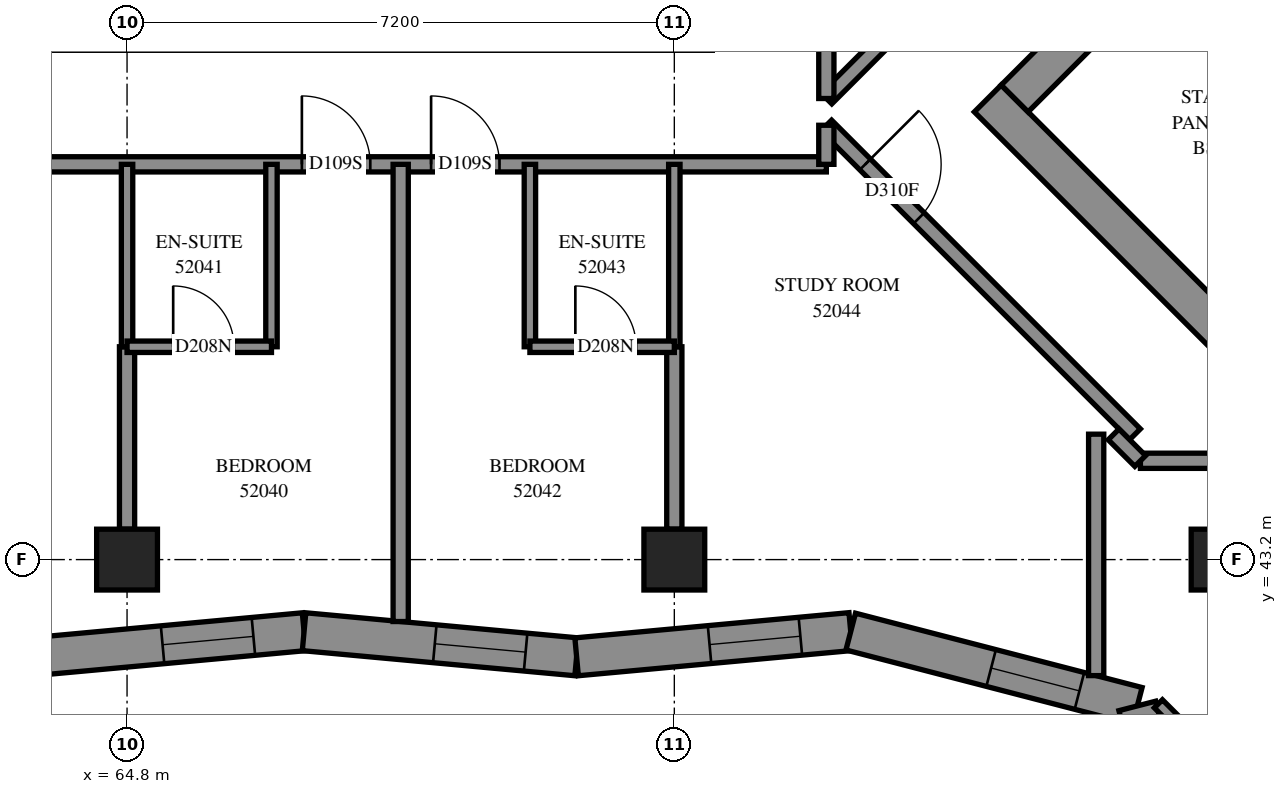
"""IFC4 building model, lengths in metres.
Left out: names, types, materials, properties, quantities, classifications, styles, units other than length and angle.
Written with IfcOpenShell. Run it as: python <this file> out.ifc"""

import sys

from ifc_helpers import new_model, si_unit, direction, frame, frame_2d, origin, origin_2d, place, context, subcontext, project, spatial, polyline, rectangle, outline, extrude, element, fill, save


model = new_model("IFC4")
c1 = context("Model", 3, precision=1e-05, world=origin(), true_north=direction((0.0, 1.0)))
c2 = subcontext(c1, "Body", "Model", "MODEL_VIEW")
j1 = project(units=[si_unit("LENGTHUNIT", "METRE"), si_unit("PLANEANGLEUNIT", "RADIAN")], contexts=[c1])
p1 = place(None, origin())
s1 = spatial("IfcSite", under=j1, at=p1, CompositionType="ELEMENT")
p2 = place(p1, origin())
s2 = spatial("IfcBuilding", under=s1, at=p2, CompositionType="ELEMENT")
p3 = place(p2, frame((0.0, 0.0, 193.0)))
s3 = spatial("IfcBuildingStorey", under=s2, at=p3, CompositionType="ELEMENT", Elevation=193.0)
for number, where, z_axis, x_axis in (
    (1, (64.8, 43.2, 0.0), (0.0, 0.0, 1.0), (1.0, 0.0, 0.0)),
    (2, (72.0, 43.2, 0.0), (0.0, 0.0, 1.0), (1.0, 0.0, 0.0)),
    (3, (79.2, 43.2, 0.0), (0.0, 0.0, 1.0), (1.0, 0.0, 0.0)),
):
    element("IfcColumn", number, at=place(p3, frame(where, z_axis=z_axis, x_axis=x_axis)), inside=s3, PredefinedType="COLUMN", context=c2, shape_type="SweptSolid", body=[
        extrude(rectangle(XDim=0.8, YDim=0.8, at=origin_2d()), origin(), (0.0, 0.0, 1.0), 3.1),
    ])
p4 = place(p3, frame((76.124, 49.267, -0.3), z_axis=(0.0, 0.0, 1.0), x_axis=(0.7071067812, -0.7071067812, 0.0)))
e4 = element("IfcWall", 4, at=p4, inside=s3, PredefinedType="SHEAR", context=c2, shape_type="SweptSolid", body=[
    extrude(rectangle(XDim=15.4, YDim=0.5, at=frame_2d((7.7, 0.0))), origin(), (0.0, 0.0, 1.0), 2.7),
])
p5 = place(p3, frame((76.478, 49.267, -0.3), z_axis=(0.0, 0.0, 1.0), x_axis=(0.7071067812, 0.7071067812, 0.0)))
e5 = element("IfcWall", 5, at=p5, inside=s3, PredefinedType="SHEAR", context=c2, shape_type="SweptSolid", body=[
    extrude(rectangle(XDim=14.4, YDim=0.5, at=frame_2d((7.2, 0.0))), origin(), (0.0, 0.0, 1.0), 2.7),
])
p6 = place(p5, frame((4.55, 0.0, 0.3)))
e6 = element("IfcOpeningElement", 6, at=p6, cuts=e5, PredefinedType="OPENING", context=c2, shape_type="SweptSolid", body=[
    extrude(rectangle(XDim=1.1, YDim=2.1, at=frame_2d((0.55, 1.05))), frame((0.0, 0.26, 0.0), z_axis=(0.0, -1.0, 0.0), x_axis=(1.0, 0.0, 0.0)), (0.0, 0.0, 1.0), 0.52),
])
p7 = place(p5, frame((11.35, 0.0, 0.3)))
e7 = element("IfcOpeningElement", 7, at=p7, cuts=e5, PredefinedType="OPENING", context=c2, shape_type="SweptSolid", body=[
    extrude(rectangle(XDim=1.1, YDim=2.1, at=frame_2d((0.55, 1.05))), frame((0.0, 0.26, 0.0), z_axis=(0.0, -1.0, 0.0), x_axis=(1.0, 0.0, 0.0)), (0.0, 0.0, 1.0), 0.52),
])
p8 = place(p3, frame((78.988, 51.423, 0.0), z_axis=(0.0, 0.0, 1.0), x_axis=(0.7071067812, -0.7071067812, 0.0)))
e8 = element("IfcWall", 8, at=p8, inside=s3, PredefinedType="SOLIDWALL", context=c2, shape_type="SweptSolid", body=[
    extrude(rectangle(XDim=14.4, YDim=0.3, at=frame_2d((7.2, 0.0))), origin(), (0.0, 0.0, 1.0), 3.1),
])
p9 = place(p8, frame((1.35, 0.0, 0.0)))
e9 = element("IfcOpeningElement", 9, at=p9, cuts=e8, PredefinedType="OPENING", context=c2, shape_type="SweptSolid", body=[
    extrude(rectangle(XDim=0.9, YDim=2.1, at=frame_2d((0.45, 1.05))), frame((0.0, 0.16, 0.0), z_axis=(0.0, -1.0, 0.0), x_axis=(1.0, 0.0, 0.0)), (0.0, 0.0, 1.0), 0.32),
])
p10 = place(p8, frame((4.95, 0.0, 0.0)))
e10 = element("IfcOpeningElement", 10, at=p10, cuts=e8, PredefinedType="OPENING", context=c2, shape_type="SweptSolid", body=[
    extrude(rectangle(XDim=0.9, YDim=2.1, at=frame_2d((0.45, 1.05))), frame((0.0, 0.16, 0.0), z_axis=(0.0, -1.0, 0.0), x_axis=(1.0, 0.0, 0.0)), (0.0, 0.0, 1.0), 0.32),
])
p11 = place(p8, frame((8.55, 0.0, 0.0)))
e11 = element("IfcOpeningElement", 11, at=p11, cuts=e8, PredefinedType="OPENING", context=c2, shape_type="SweptSolid", body=[
    extrude(rectangle(XDim=0.9, YDim=2.1, at=frame_2d((0.45, 1.05))), frame((0.0, 0.16, 0.0), z_axis=(0.0, -1.0, 0.0), x_axis=(1.0, 0.0, 0.0)), (0.0, 0.0, 1.0), 0.32),
])
p12 = place(p8, frame((12.05, 0.0, 0.0)))
e12 = element("IfcOpeningElement", 12, at=p12, cuts=e8, PredefinedType="OPENING", context=c2, shape_type="SweptSolid", body=[
    extrude(rectangle(XDim=1.1, YDim=2.1, at=frame_2d((0.55, 1.05))), frame((0.0, 0.16, 0.0), z_axis=(0.0, -1.0, 0.0), x_axis=(1.0, 0.0, 0.0)), (0.0, 0.0, 1.0), 0.32),
])
p13 = place(p3, frame((63.543, 41.921, 0.0), z_axis=(0.0, 0.0, 1.0), x_axis=(0.9957919806, 0.09164241, 0.0)))
e13 = element("IfcWall", 13, at=p13, inside=s3, PredefinedType="SOLIDWALL", context=c2, shape_type="SweptSolid", body=[
    extrude(outline(polyline([(-0.023, -0.25), (3.578, -0.25), (3.624, 0.25), (0.023, 0.25), (-0.023, -0.25)])), origin(), (0.0, 0.0, 1.0), 3.1),
])
p14 = place(p13, frame((1.732, 0.0, 0.45)))
e14 = element("IfcOpeningElement", 14, at=p14, cuts=e13, PredefinedType="OPENING", context=c2, shape_type="SweptSolid", body=[
    extrude(rectangle(XDim=1.2, YDim=2.5, at=frame_2d((0.6, 1.25))), frame((0.0, 0.26, 0.0), z_axis=(0.0, -1.0, 0.0), x_axis=(1.0, 0.0, 0.0)), (0.0, 0.0, 1.0), 0.52),
])
p15 = place(p3, frame((67.129, 42.251, 0.0), z_axis=(0.0, 0.0, 1.0), x_axis=(0.9957917474, -0.0916449443, 0.0)))
e15 = element("IfcWall", 15, at=p15, inside=s3, PredefinedType="SOLIDWALL", context=c2, shape_type="SweptSolid", body=[
    extrude(outline(polyline([(0.023, -0.25), (3.624, -0.25), (3.578, 0.25), (-0.023, 0.25), (0.023, -0.25)])), origin(), (0.0, 0.0, 1.0), 3.1),
])
p16 = place(p15, frame((1.727, 0.0, 0.45)))
e16 = element("IfcOpeningElement", 16, at=p16, cuts=e15, PredefinedType="OPENING", context=c2, shape_type="SweptSolid", body=[
    extrude(rectangle(XDim=1.2, YDim=2.5, at=frame_2d((0.6, 1.25))), frame((0.0, 0.26, 0.0), z_axis=(0.0, -1.0, 0.0), x_axis=(1.0, 0.0, 0.0)), (0.0, 0.0, 1.0), 0.52),
])
p17 = place(p3, frame((70.714, 41.921, 0.0), z_axis=(0.0, 0.0, 1.0), x_axis=(0.9957941627, 0.0916186959, 0.0)))
e17 = element("IfcWall", 17, at=p17, inside=s3, PredefinedType="SOLIDWALL", context=c2, shape_type="SweptSolid", body=[
    extrude(outline(polyline([(-0.023, -0.25), (3.578, -0.25), (3.665, 0.25), (0.023, 0.25), (-0.023, -0.25)])), origin(), (0.0, 0.0, 1.0), 3.1),
])
p18 = place(p17, frame((1.756, 0.0, 0.45)))
e18 = element("IfcOpeningElement", 18, at=p18, cuts=e17, PredefinedType="OPENING", context=c2, shape_type="SweptSolid", body=[
    extrude(rectangle(XDim=1.2, YDim=2.5, at=frame_2d((0.6, 1.25))), frame((0.0, 0.26, 0.0), z_axis=(0.0, -1.0, 0.0), x_axis=(1.0, 0.0, 0.0)), (0.0, 0.0, 1.0), 0.52),
])
p19 = place(p3, frame((74.321, 42.253, 0.0), z_axis=(0.0, 0.0, 1.0), x_axis=(0.9679758757, -0.2510432315, 0.0)))
e19 = element("IfcWall", 19, at=p19, inside=s3, PredefinedType="SOLIDWALL", context=c2, shape_type="SweptSolid", body=[
    extrude(outline(polyline([(0.044, -0.25), (3.748, -0.25), (4.043, 0.25), (-0.044, 0.25), (0.044, -0.25)])), origin(), (0.0, 0.0, 1.0), 3.1),
])
p20 = place(p19, frame((1.909, 0.0, 0.45)))
e20 = element("IfcOpeningElement", 20, at=p20, cuts=e19, PredefinedType="OPENING", context=c2, shape_type="SweptSolid", body=[
    extrude(rectangle(XDim=1.2, YDim=2.5, at=frame_2d((0.6, 1.25))), frame((0.0, 0.26, 0.0), z_axis=(0.0, -1.0, 0.0), x_axis=(1.0, 0.0, 0.0)), (0.0, 0.0, 1.0), 0.52),
])
p21 = place(p3, frame((78.091, 41.275, 0.0), z_axis=(0.0, 0.0, 1.0), x_axis=(0.2493551668, -0.9684121028, 0.0)))
e21 = element("IfcWall", 21, at=p21, inside=s3, PredefinedType="SOLIDWALL", context=c2, shape_type="SweptSolid", body=[
    extrude(outline(polyline([(0.147, -0.25), (4.868, -0.25), (4.585, 0.25), (-0.147, 0.25), (0.147, -0.25)])), origin(), (0.0, 0.0, 1.0), 3.1),
])
p22 = place(p21, frame((2.207, 0.0, 0.45)))
e22 = element("IfcOpeningElement", 22, at=p22, cuts=e21, PredefinedType="OPENING", context=c2, shape_type="SweptSolid", body=[
    extrude(rectangle(XDim=1.2, YDim=2.5, at=frame_2d((0.6, 1.25))), frame((0.0, 0.26, 0.0), z_axis=(0.0, -1.0, 0.0), x_axis=(1.0, 0.0, 0.0)), (0.0, 0.0, 1.0), 0.52),
])
p23 = place(p21, frame((0.331, 0.0, 0.45)))
e23 = element("IfcOpeningElement", 23, at=p23, cuts=e21, PredefinedType="OPENING", context=c2, shape_type="SweptSolid", body=[
    extrude(rectangle(XDim=0.8, YDim=2.5, at=frame_2d((0.4, 1.25))), frame((0.0, 0.26, 0.0), z_axis=(0.0, -1.0, 0.0), x_axis=(1.0, 0.0, 0.0)), (0.0, 0.0, 1.0), 0.52),
])
p24 = place(p3, frame((55.6, 48.4, 0.0), z_axis=(0.0, 0.0, 1.0), x_axis=(1.0, 0.0, 0.0)))
e24 = element("IfcWall", 24, at=p24, inside=s3, PredefinedType="PARTITIONING", context=c2, shape_type="SweptSolid", body=[
    extrude(rectangle(XDim=18.4, YDim=0.2, at=frame_2d((9.2, 0.0))), origin(), (0.0, 0.0, 1.0), 3.1),
])
p25 = place(p24, frame((5.862, 0.0, 0.0)))
e25 = element("IfcOpeningElement", 25, at=p25, cuts=e24, PredefinedType="OPENING", context=c2, shape_type="SweptSolid", body=[
    extrude(rectangle(XDim=1.0, YDim=2.1, at=frame_2d((0.5, 1.05))), frame((0.0, 0.11, 0.0), z_axis=(0.0, -1.0, 0.0), x_axis=(1.0, 0.0, 0.0)), (0.0, 0.0, 1.0), 0.22),
])
p26 = place(p24, frame((11.5, 0.0, 0.0)))
e26 = element("IfcOpeningElement", 26, at=p26, cuts=e24, PredefinedType="OPENING", context=c2, shape_type="SweptSolid", body=[
    extrude(rectangle(XDim=0.9, YDim=2.1, at=frame_2d((0.45, 1.05))), frame((0.0, 0.11, 0.0), z_axis=(0.0, -1.0, 0.0), x_axis=(1.0, 0.0, 0.0)), (0.0, 0.0, 1.0), 0.22),
])
p27 = place(p24, frame((13.2, 0.0, 0.0)))
e27 = element("IfcOpeningElement", 27, at=p27, cuts=e24, PredefinedType="OPENING", context=c2, shape_type="SweptSolid", body=[
    extrude(rectangle(XDim=0.9, YDim=2.1, at=frame_2d((0.45, 1.05))), frame((0.0, 0.11, 0.0), z_axis=(0.0, -1.0, 0.0), x_axis=(1.0, 0.0, 0.0)), (0.0, 0.0, 1.0), 0.22),
])
p28 = place(p3, frame((68.4, 42.385, 0.0), z_axis=(0.0, 0.0, 1.0), x_axis=(0.0, 1.0, 0.0)))
e28 = element("IfcWall", 28, at=p28, inside=s3, PredefinedType="PARTITIONING", context=c2, shape_type="SweptSolid", body=[
    extrude(rectangle(XDim=6.015, YDim=0.2, at=frame_2d((3.007, 0.0))), origin(), (0.0, 0.0, 1.0), 3.1),
])
p29 = place(p3, frame((73.999, 48.911, 0.0), z_axis=(0.0, 0.0, 1.0), x_axis=(0.7071067812, -0.7071067812, 0.0)))
e29 = element("IfcWall", 29, at=p29, inside=s3, PredefinedType="PARTITIONING", context=c2, shape_type="SweptSolid", body=[
    extrude(rectangle(XDim=5.745, YDim=0.2, at=frame_2d((2.872, 0.0))), origin(), (0.0, 0.0, 1.0), 3.1),
])
p30 = place(p29, frame((0.724, 0.0, 0.0)))
e30 = element("IfcOpeningElement", 30, at=p30, cuts=e29, PredefinedType="OPENING", context=c2, shape_type="SweptSolid", body=[
    extrude(rectangle(XDim=1.0, YDim=2.1, at=frame_2d((0.5, 1.05))), frame((0.0, 0.11, 0.0), z_axis=(0.0, -1.0, 0.0), x_axis=(1.0, 0.0, 0.0)), (0.0, 0.0, 1.0), 0.22),
])
p31 = place(p3, frame((74.001, 49.267, 0.0), z_axis=(0.0, 0.0, 1.0), x_axis=(0.7071067812, 0.7071067812, 0.0)))
e31 = element("IfcWall", 31, at=p31, inside=s3, PredefinedType="PARTITIONING", context=c2, shape_type="SweptSolid", body=[
    extrude(rectangle(XDim=5.278, YDim=0.2, at=frame_2d((2.639, 0.0))), origin(), (0.0, 0.0, 1.0), 3.1),
])
p32 = place(p3, frame((74.0, 49.266, 0.0), z_axis=(0.0, 0.0, 1.0), x_axis=(0.0, 1.0, 0.0)))
e32 = element("IfcWall", 32, at=p32, inside=s3, PredefinedType="PARTITIONING", context=c2, shape_type="SweptSolid", body=[
    extrude(rectangle(XDim=3.734, YDim=0.2, at=frame_2d((1.867, 0.0))), origin(), (0.0, 0.0, 1.0), 3.1),
])
p33 = place(p3, frame((77.55, 41.674, 0.0), z_axis=(0.0, 0.0, 1.0), x_axis=(0.0, 1.0, 0.0)))
e33 = element("IfcWall", 33, at=p33, inside=s3, PredefinedType="PARTITIONING", context=c2, shape_type="SweptSolid", body=[
    extrude(rectangle(XDim=3.176, YDim=0.2, at=frame_2d((1.588, 0.0))), origin(), (0.0, 0.0, 1.0), 3.1),
])
p34 = place(p3, frame((78.368, 41.303, 0.0), z_axis=(0.0, 0.0, 1.0), x_axis=(0.7065867451, -0.7076264351, 0.0)))
e34 = element("IfcWall", 34, at=p34, inside=s3, PredefinedType="PARTITIONING", context=c2, shape_type="SweptSolid", body=[
    extrude(rectangle(XDim=2.982, YDim=0.15, at=frame_2d((1.491, 0.0))), origin(), (0.0, 0.0, 1.0), 3.1),
])
p35 = place(p3, frame((64.8, 43.6, 0.0), z_axis=(0.0, 0.0, 1.0), x_axis=(0.0, 1.0, 0.0)))
e35 = element("IfcWall", 35, at=p35, inside=s3, PredefinedType="PARTITIONING", context=c2, shape_type="SweptSolid", body=[
    extrude(rectangle(XDim=2.4, YDim=0.2, at=frame_2d((1.2, 0.0))), origin(), (0.0, 0.0, 1.0), 3.1),
])
for number, where, z_axis, x_axis in (
    (36, (66.7, 46.0, 0.0), (0.0, 0.0, 1.0), (0.0, 1.0, 0.0)),
    (37, (64.8, 46.0, 0.0), (0.0, 0.0, 1.0), (0.0, 1.0, 0.0)),
    (38, (70.1, 46.0, 0.0), (0.0, 0.0, 1.0), (0.0, 1.0, 0.0)),
):
    element("IfcWall", number, at=place(p3, frame(where, z_axis=z_axis, x_axis=x_axis)), inside=s3, PredefinedType="PARTITIONING", context=c2, shape_type="SweptSolid", body=[
        extrude(rectangle(XDim=2.4, YDim=0.15, at=frame_2d((1.2, 0.0))), origin(), (0.0, 0.0, 1.0), 3.1),
    ])
p36 = place(p3, frame((72.0, 43.6, 0.0), z_axis=(0.0, 0.0, 1.0), x_axis=(0.0, 1.0, 0.0)))
e39 = element("IfcWall", 39, at=p36, inside=s3, PredefinedType="PARTITIONING", context=c2, shape_type="SweptSolid", body=[
    extrude(rectangle(XDim=2.4, YDim=0.2, at=frame_2d((1.2, 0.0))), origin(), (0.0, 0.0, 1.0), 3.1),
])
p37 = place(p3, frame((72.0, 46.0, 0.0), z_axis=(0.0, 0.0, 1.0), x_axis=(0.0, 1.0, 0.0)))
e40 = element("IfcWall", 40, at=p37, inside=s3, PredefinedType="PARTITIONING", context=c2, shape_type="SweptSolid", body=[
    extrude(rectangle(XDim=2.4, YDim=0.15, at=frame_2d((1.2, 0.0))), origin(), (0.0, 0.0, 1.0), 3.1),
])
p38 = place(p3, frame((78.132, 44.5, 0.0), z_axis=(0.0, 0.0, 1.0), x_axis=(1.0, 0.0, 0.0)))
e41 = element("IfcWall", 41, at=p38, inside=s3, PredefinedType="PARTITIONING", context=c2, shape_type="SweptSolid", body=[
    extrude(rectangle(XDim=2.292, YDim=0.2, at=frame_2d((1.146, 0.0))), origin(), (0.0, 0.0, 1.0), 3.1),
])
p39 = place(p3, frame((78.661, 40.067, 0.0), z_axis=(0.0, 0.0, 1.0), x_axis=(0.7070829621, 0.7071305995, 0.0)))
e42 = element("IfcWall", 42, at=p39, inside=s3, PredefinedType="PARTITIONING", context=c2, shape_type="SweptSolid", body=[
    extrude(rectangle(XDim=2.099, YDim=0.15, at=frame_2d((1.05, 0.0))), origin(), (0.0, 0.0, 1.0), 3.1),
])
p40 = place(p3, frame((64.8, 46.0, 0.0), z_axis=(0.0, 0.0, 1.0), x_axis=(1.0, 0.0, 0.0)))
e43 = element("IfcWall", 43, at=p40, inside=s3, PredefinedType="PARTITIONING", context=c2, shape_type="SweptSolid", body=[
    extrude(rectangle(XDim=1.9, YDim=0.15, at=frame_2d((0.95, 0.0))), origin(), (0.0, 0.0, 1.0), 3.1),
])
p41 = place(p40, frame((0.607, 0.0, 0.0)))
e44 = element("IfcOpeningElement", 44, at=p41, cuts=e43, PredefinedType="OPENING", context=c2, shape_type="SweptSolid", body=[
    extrude(rectangle(XDim=0.8, YDim=2.1, at=frame_2d((0.4, 1.05))), frame((0.0, 0.085, 0.0), z_axis=(0.0, -1.0, 0.0), x_axis=(1.0, 0.0, 0.0)), (0.0, 0.0, 1.0), 0.17),
])
p42 = place(p3, frame((70.1, 46.0, 0.0), z_axis=(0.0, 0.0, 1.0), x_axis=(1.0, 0.0, 0.0)))
e45 = element("IfcWall", 45, at=p42, inside=s3, PredefinedType="PARTITIONING", context=c2, shape_type="SweptSolid", body=[
    extrude(rectangle(XDim=1.9, YDim=0.15, at=frame_2d((0.95, 0.0))), origin(), (0.0, 0.0, 1.0), 3.1),
])
p43 = place(p42, frame((0.598, 0.0, 0.0)))
e46 = element("IfcOpeningElement", 46, at=p43, cuts=e45, PredefinedType="OPENING", context=c2, shape_type="SweptSolid", body=[
    extrude(rectangle(XDim=0.8, YDim=2.1, at=frame_2d((0.4, 1.05))), frame((0.0, 0.085, 0.0), z_axis=(0.0, -1.0, 0.0), x_axis=(1.0, 0.0, 0.0)), (0.0, 0.0, 1.0), 0.17),
])
p44 = place(p3, frame((74.0, 48.4, 0.0), z_axis=(0.0, 0.0, 1.0), x_axis=(0.0, 1.0, 0.0)))
e47 = element("IfcWall", 47, at=p44, inside=s3, PredefinedType="PARTITIONING", context=c2, shape_type="SweptSolid", body=[
    extrude(rectangle(XDim=0.514, YDim=0.2, at=frame_2d((0.257, 0.0))), origin(), (0.0, 0.0, 1.0), 3.1),
])
p45 = place(p3, frame((77.779, 44.847, 0.0), z_axis=(0.0, 0.0, 1.0), x_axis=(0.7071067812, -0.7071067812, 0.0)))
e48 = element("IfcWall", 48, at=p45, inside=s3, PredefinedType="PARTITIONING", context=c2, shape_type="SweptSolid", body=[
    extrude(rectangle(XDim=0.495, YDim=0.2, at=frame_2d((0.247, 0.0))), origin(), (0.0, 0.0, 1.0), 3.1),
])
p46 = place(p14, origin())
e49 = element("IfcWindow", 49, at=p46, inside=s3, PartitioningType="SINGLE_PANEL", PredefinedType="WINDOW", context=c2, shape_type="SweptSolid", body=[
    extrude(rectangle(XDim=1.2, YDim=2.5, at=frame_2d((0.6, 1.25))), frame((0.0, 0.18, 0.0), z_axis=(0.0, -1.0, 0.0), x_axis=(1.0, 0.0, 0.0)), (0.0, 0.0, 1.0), 0.06),
])
fill(e14, e49)
p47 = place(p16, origin())
e50 = element("IfcWindow", 50, at=p47, inside=s3, PartitioningType="SINGLE_PANEL", PredefinedType="WINDOW", context=c2, shape_type="SweptSolid", body=[
    extrude(rectangle(XDim=1.2, YDim=2.5, at=frame_2d((0.6, 1.25))), frame((0.0, 0.18, 0.0), z_axis=(0.0, -1.0, 0.0), x_axis=(1.0, 0.0, 0.0)), (0.0, 0.0, 1.0), 0.06),
])
fill(e16, e50)
p48 = place(p18, origin())
e51 = element("IfcWindow", 51, at=p48, inside=s3, PartitioningType="SINGLE_PANEL", PredefinedType="WINDOW", context=c2, shape_type="SweptSolid", body=[
    extrude(rectangle(XDim=1.2, YDim=2.5, at=frame_2d((0.6, 1.25))), frame((0.0, 0.18, 0.0), z_axis=(0.0, -1.0, 0.0), x_axis=(1.0, 0.0, 0.0)), (0.0, 0.0, 1.0), 0.06),
])
fill(e18, e51)
p49 = place(p20, origin())
e52 = element("IfcWindow", 52, at=p49, inside=s3, PartitioningType="SINGLE_PANEL", PredefinedType="WINDOW", context=c2, shape_type="SweptSolid", body=[
    extrude(rectangle(XDim=1.2, YDim=2.5, at=frame_2d((0.6, 1.25))), frame((0.0, 0.18, 0.0), z_axis=(0.0, -1.0, 0.0), x_axis=(1.0, 0.0, 0.0)), (0.0, 0.0, 1.0), 0.06),
])
fill(e20, e52)
p50 = place(p26, origin())
e53 = element("IfcDoor", 53, at=p50, inside=s3, OperationType="SINGLE_SWING_LEFT", PredefinedType="DOOR", context=c2, shape_type="SweptSolid", body=[
    extrude(rectangle(XDim=0.9, YDim=2.1, at=frame_2d((0.45, 1.05))), frame((0.0, 0.025, 0.0), z_axis=(0.0, -1.0, 0.0), x_axis=(1.0, 0.0, 0.0)), (0.0, 0.0, 1.0), 0.05),
])
fill(e26, e53)
p51 = place(p41, origin())
e54 = element("IfcDoor", 54, at=p51, inside=s3, OperationType="SINGLE_SWING_RIGHT", PredefinedType="DOOR", context=c2, shape_type="SweptSolid", body=[
    extrude(rectangle(XDim=0.8, YDim=2.1, at=frame_2d((0.4, 1.05))), frame((0.0, 0.025, 0.0), z_axis=(0.0, -1.0, 0.0), x_axis=(1.0, 0.0, 0.0)), (0.0, 0.0, 1.0), 0.05),
])
fill(e44, e54)
p52 = place(p27, origin())
e55 = element("IfcDoor", 55, at=p52, inside=s3, OperationType="SINGLE_SWING_RIGHT", PredefinedType="DOOR", context=c2, shape_type="SweptSolid", body=[
    extrude(rectangle(XDim=0.9, YDim=2.1, at=frame_2d((0.45, 1.05))), frame((0.0, 0.025, 0.0), z_axis=(0.0, -1.0, 0.0), x_axis=(1.0, 0.0, 0.0)), (0.0, 0.0, 1.0), 0.05),
])
fill(e27, e55)
p53 = place(p43, origin())
e56 = element("IfcDoor", 56, at=p53, inside=s3, OperationType="SINGLE_SWING_RIGHT", PredefinedType="DOOR", context=c2, shape_type="SweptSolid", body=[
    extrude(rectangle(XDim=0.8, YDim=2.1, at=frame_2d((0.4, 1.05))), frame((0.0, 0.025, 0.0), z_axis=(0.0, -1.0, 0.0), x_axis=(1.0, 0.0, 0.0)), (0.0, 0.0, 1.0), 0.05),
])
fill(e46, e56)
p54 = place(p30, origin())
e57 = element("IfcDoor", 57, at=p54, inside=s3, OperationType="SINGLE_SWING_LEFT", PredefinedType="DOOR", context=c2, shape_type="SweptSolid", body=[
    extrude(rectangle(XDim=1.0, YDim=2.1, at=frame_2d((0.5, 1.05))), frame((0.0, 0.025, 0.0), z_axis=(0.0, -1.0, 0.0), x_axis=(1.0, 0.0, 0.0)), (0.0, 0.0, 1.0), 0.05),
])
fill(e30, e57)
save(model, sys.argv[1])
